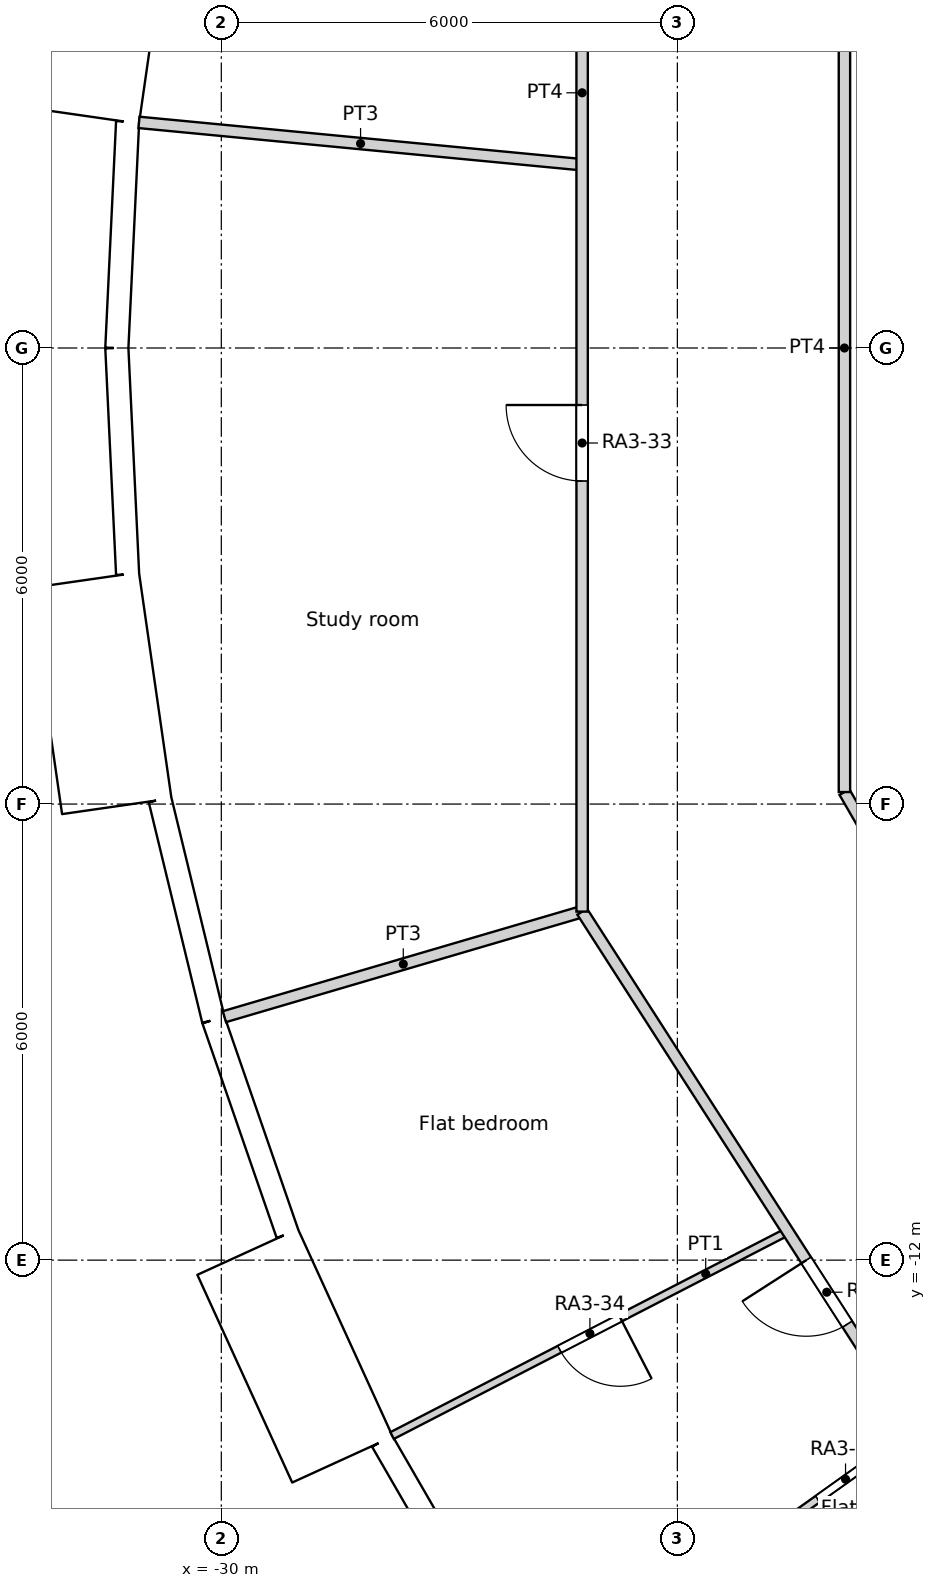
"""IFC4 building model, lengths in metres.
Left out: names, types, materials, properties, quantities, classifications, styles, units other than length and angle.
Written with IfcOpenShell. Run it as: python <this file> out.ifc"""

import sys

from ifc_helpers import new_model, si_unit, direction, frame, frame_2d, origin, origin_2d, place, context, subcontext, project, spatial, rectangle, circle, extrude, element, fill, save


model = new_model("IFC4")
c1 = context("Model", 3, precision=1e-05, world=origin(), true_north=direction((0.0, 1.0)))
c2 = subcontext(c1, "Body", "Model", "MODEL_VIEW")
j1 = project(units=[si_unit("LENGTHUNIT", "METRE"), si_unit("PLANEANGLEUNIT", "RADIAN")], contexts=[c1])
p1 = place(None, origin())
s1 = spatial("IfcSite", under=j1, at=p1, CompositionType="ELEMENT")
p2 = place(p1, origin())
s2 = spatial("IfcBuilding", under=s1, at=p2, CompositionType="ELEMENT")
p3 = place(p2, frame((0.0, 0.0, 49.8)))
s3 = spatial("IfcBuildingStorey", under=s2, at=p3, CompositionType="ELEMENT", Elevation=49.8)
for number, where, z_axis, x_axis in (
    (1, (-30.137, 2.878, 0.0), (0.0, 0.0, 1.0), (1.0, 0.0, 0.0)),
    (2, (-30.137, -2.878, 0.0), (0.0, 0.0, 1.0), (1.0, 0.0, 0.0)),
    (3, (-29.048, -8.529, 0.0), (0.0, 0.0, 1.0), (1.0, 0.0, 0.0)),
    (4, (-26.909, -13.873, 0.0), (0.0, 0.0, 1.0), (1.0, 0.0, 0.0)),
):
    element("IfcColumn", number, at=place(p3, frame(where, z_axis=z_axis, x_axis=x_axis)), inside=s3, PredefinedType="COLUMN", context=c2, shape_type="SweptSolid", body=[
        extrude(circle(Radius=0.7, at=origin_2d()), origin(), (0.0, 0.0, 1.0), 3.6),
    ])
for number, where, z_axis, x_axis in (
    (5, (-24.382, 2.85, 0.0), (0.0, 0.0, 1.0), (1.0, 0.0, 0.0)),
    (6, (-24.382, -2.85, 0.0), (0.0, 0.0, 1.0), (1.0, 0.0, 0.0)),
    (7, (-23.067, -8.396, 0.0), (0.0, 0.0, 1.0), (1.0, 0.0, 0.0)),
):
    element("IfcColumn", number, at=place(p3, frame(where, z_axis=z_axis, x_axis=x_axis)), inside=s3, PredefinedType="COLUMN", context=c2, shape_type="SweptSolid", body=[
        extrude(circle(Radius=0.75, at=origin_2d()), origin(), (0.0, 0.0, 1.0), 3.6),
    ])
p4 = place(p3, frame((-31.375, 6.027, -0.45), z_axis=(0.0, 0.0, 1.0), x_axis=(-0.142332746704, -0.989818866872, 0.0)))
e8 = element("IfcWall", 8, at=p4, inside=s3, PredefinedType="ELEMENTEDWALL", context=c2, shape_type="SweptSolid", body=[
    extrude(rectangle(XDim=3.0, YDim=1.45, at=frame_2d((1.5, 0.0))), origin(), (0.0, 0.0, 1.0), 3.6),
])
p5 = place(p4, frame((1.5, 0.0, 2.0)))
e9 = element("IfcOpeningElement", 9, at=p5, cuts=e8, PredefinedType="OPENING", context=c2, shape_type="SweptSolid", body=[
    extrude(circle(Radius=0.9, at=origin_2d()), frame((0.0, 0.735, 0.0), z_axis=(0.0, -1.0, 0.0), x_axis=(1.0, 0.0, 0.0)), (0.0, 0.0, 1.0), 1.47),
])
p6 = place(p3, frame((-31.233, 2.976, 0.0), z_axis=(0.0, 0.0, 1.0), x_axis=(-0.047604077644, -0.998866283239, 0.0)))
e10 = element("IfcWall", 10, at=p6, inside=s3, PredefinedType="SOLIDWALL", context=c2, shape_type="SweptSolid", body=[
    extrude(rectangle(XDim=2.98, YDim=0.3, at=frame_2d((1.49, 0.0))), origin(), (0.0, 0.0, 1.0), 3.15),
])
p7 = place(p6, frame((1.49, 0.0, 1.55)))
e11 = element("IfcOpeningElement", 11, at=p7, cuts=e10, PredefinedType="OPENING", context=c2, shape_type="SweptSolid", body=[
    extrude(circle(Radius=0.9, at=origin_2d()), frame((0.0, 0.16, 0.0), z_axis=(0.0, -1.0, 0.0), x_axis=(1.0, 0.0, 0.0)), (0.0, 0.0, 1.0), 0.32),
])
p8 = place(p3, frame((-31.375, 0.0, 0.0), z_axis=(0.0, 0.0, 1.0), x_axis=(0.047604077644, -0.998866283239, 0.0)))
e12 = element("IfcWall", 12, at=p8, inside=s3, PredefinedType="SOLIDWALL", context=c2, shape_type="SweptSolid", body=[
    extrude(rectangle(XDim=2.98, YDim=0.3, at=frame_2d((1.49, 0.0))), origin(), (0.0, 0.0, 1.0), 3.15),
])
p9 = place(p8, frame((1.49, 0.0, 1.55)))
e13 = element("IfcOpeningElement", 13, at=p9, cuts=e12, PredefinedType="OPENING", context=c2, shape_type="SweptSolid", body=[
    extrude(circle(Radius=0.9, at=origin_2d()), frame((0.0, 0.16, 0.0), z_axis=(0.0, -1.0, 0.0), x_axis=(1.0, 0.0, 0.0)), (0.0, 0.0, 1.0), 0.32),
])
p10 = place(p3, frame((-31.802, -3.057, -0.45), z_axis=(0.0, 0.0, 1.0), x_axis=(0.142332746704, -0.989818866872, 0.0)))
e14 = element("IfcWall", 14, at=p10, inside=s3, PredefinedType="ELEMENTEDWALL", context=c2, shape_type="SweptSolid", body=[
    extrude(rectangle(XDim=3.0, YDim=1.45, at=frame_2d((1.5, 0.0))), origin(), (0.0, 0.0, 1.0), 3.6),
])
p11 = place(p10, frame((1.5, 0.0, 2.0)))
e15 = element("IfcOpeningElement", 15, at=p11, cuts=e14, PredefinedType="OPENING", context=c2, shape_type="SweptSolid", body=[
    extrude(circle(Radius=0.9, at=origin_2d()), frame((0.0, 0.735, 0.0), z_axis=(0.0, -1.0, 0.0), x_axis=(1.0, 0.0, 0.0)), (0.0, 0.0, 1.0), 1.47),
])
p12 = place(p3, frame((-30.806, -5.944, 0.0), z_axis=(0.0, 0.0, 1.0), x_axis=(0.235743081534, -0.971815414319, 0.0)))
e16 = element("IfcWall", 16, at=p12, inside=s3, PredefinedType="SOLIDWALL", context=c2, shape_type="SweptSolid", body=[
    extrude(rectangle(XDim=2.979, YDim=0.3, at=frame_2d((1.49, 0.0))), origin(), (0.0, 0.0, 1.0), 3.15),
])
p13 = place(p12, frame((1.49, 0.0, 1.55)))
e17 = element("IfcOpeningElement", 17, at=p13, cuts=e16, PredefinedType="OPENING", context=c2, shape_type="SweptSolid", body=[
    extrude(circle(Radius=0.9, at=origin_2d()), frame((0.0, 0.16, 0.0), z_axis=(0.0, -1.0, 0.0), x_axis=(1.0, 0.0, 0.0)), (0.0, 0.0, 1.0), 0.32),
])
p14 = place(p3, frame((-30.104, -8.839, 0.0), z_axis=(0.0, 0.0, 1.0), x_axis=(0.327071167136, -0.944999709856, 0.0)))
e18 = element("IfcWall", 18, at=p14, inside=s3, PredefinedType="SOLIDWALL", context=c2, shape_type="SweptSolid", body=[
    extrude(rectangle(XDim=2.98, YDim=0.3, at=frame_2d((1.49, 0.0))), origin(), (0.0, 0.0, 1.0), 3.15),
])
p15 = place(p14, frame((1.49, 0.0, 1.55)))
e19 = element("IfcOpeningElement", 19, at=p15, cuts=e18, PredefinedType="OPENING", context=c2, shape_type="SweptSolid", body=[
    extrude(circle(Radius=0.9, at=origin_2d()), frame((0.0, 0.16, 0.0), z_axis=(0.0, -1.0, 0.0), x_axis=(1.0, 0.0, 0.0)), (0.0, 0.0, 1.0), 0.32),
])
p16 = place(p3, frame((-29.653, -11.893, -0.45), z_axis=(0.0, 0.0, 1.0), x_axis=(0.415427028395, -0.909626508012, 0.0)))
e20 = element("IfcWall", 20, at=p16, inside=s3, PredefinedType="ELEMENTEDWALL", context=c2, shape_type="SweptSolid", body=[
    extrude(rectangle(XDim=3.0, YDim=1.45, at=frame_2d((1.5, 0.0))), origin(), (0.0, 0.0, 1.0), 3.6),
])
p17 = place(p16, frame((1.5, 0.0, 2.0)))
e21 = element("IfcOpeningElement", 21, at=p17, cuts=e20, PredefinedType="OPENING", context=c2, shape_type="SweptSolid", body=[
    extrude(circle(Radius=0.9, at=origin_2d()), frame((0.0, 0.735, 0.0), z_axis=(0.0, -1.0, 0.0), x_axis=(1.0, 0.0, 0.0)), (0.0, 0.0, 1.0), 1.47),
])
p18 = place(p3, frame((-27.884, -14.382, 0.0), z_axis=(0.0, 0.0, 1.0), x_axis=(0.500025049464, -0.866010940986, 0.0)))
e22 = element("IfcWall", 22, at=p18, inside=s3, PredefinedType="SOLIDWALL", context=c2, shape_type="SweptSolid", body=[
    extrude(rectangle(XDim=2.98, YDim=0.3, at=frame_2d((1.49, 0.0))), origin(), (0.0, 0.0, 1.0), 3.15),
])
p19 = place(p18, frame((1.49, 0.0, 1.55)))
e23 = element("IfcOpeningElement", 23, at=p19, cuts=e22, PredefinedType="OPENING", context=c2, shape_type="SweptSolid", body=[
    extrude(circle(Radius=0.9, at=origin_2d()), frame((0.0, 0.16, 0.0), z_axis=(0.0, -1.0, 0.0), x_axis=(1.0, 0.0, 0.0)), (0.0, 0.0, 1.0), 0.32),
])
p20 = place(p3, frame((-21.802, -5.842, 0.0), z_axis=(0.0, 0.0, 1.0), x_axis=(0.0, 1.0, 0.0)))
e24 = element("IfcWall", 24, at=p20, inside=s3, PredefinedType="PARTITIONING", context=c2, shape_type="SweptSolid", body=[
    extrude(rectangle(XDim=11.684, YDim=0.15, at=frame_2d((5.842, 0.0))), origin(), (0.0, 0.0, 1.0), 3.15),
])
p21 = place(p3, frame((-21.802, -5.842, 0.0), z_axis=(0.0, 0.0, 1.0), x_axis=(0.500277597875, -0.865865073245, 0.0)))
e25 = element("IfcWall", 25, at=p21, inside=s3, PredefinedType="PARTITIONING", context=c2, shape_type="SweptSolid", body=[
    extrude(rectangle(XDim=0.875, YDim=0.15, at=frame_2d((0.438, 0.0))), origin(), (0.0, 0.0, 1.0), 3.15),
])
p22 = place(p3, frame((-25.253, -7.415, 0.0), z_axis=(0.0, 0.0, 1.0), x_axis=(0.0, 1.0, 0.0)))
e26 = element("IfcWall", 26, at=p22, inside=s3, PredefinedType="PARTITIONING", context=c2, shape_type="SweptSolid", body=[
    extrude(rectangle(XDim=14.83, YDim=0.15, at=frame_2d((7.415, 0.0))), origin(), (0.0, 0.0, 1.0), 3.15),
])
p23 = place(p22, frame((5.665, 0.0, 0.0)))
e27 = element("IfcOpeningElement", 27, at=p23, cuts=e26, PredefinedType="OPENING", context=c2, shape_type="SweptSolid", body=[
    extrude(rectangle(XDim=1.0, YDim=2.04, at=frame_2d((0.5, 1.02))), frame((0.0, 0.075, 0.0), z_axis=(0.0, -1.0, 0.0), x_axis=(1.0, 0.0, 0.0)), (0.0, 0.0, 1.0), 0.15),
])
p24 = place(p3, frame((-25.253, -7.415, 0.0), z_axis=(0.0, 0.0, 1.0), x_axis=(0.540667724156, -0.841236240337, 0.0)))
e28 = element("IfcWall", 28, at=p24, inside=s3, PredefinedType="PARTITIONING", context=c2, shape_type="SweptSolid", body=[
    extrude(rectangle(XDim=14.83, YDim=0.15, at=frame_2d((7.415, 0.0))), origin(), (0.0, 0.0, 1.0), 3.15),
])
p25 = place(p24, frame((5.452, 0.0, 0.0)))
e29 = element("IfcOpeningElement", 29, at=p25, cuts=e28, PredefinedType="OPENING", context=c2, shape_type="SweptSolid", body=[
    extrude(rectangle(XDim=1.0, YDim=2.1, at=frame_2d((0.5, 1.05))), frame((0.0, 0.075, 0.0), z_axis=(0.0, -1.0, 0.0), x_axis=(1.0, 0.0, 0.0)), (0.0, 0.0, 1.0), 0.15),
])
p26 = place(p3, frame((-31.083, 2.968, 0.0), z_axis=(0.0, 0.0, 1.0), x_axis=(0.995465070325, -0.095127775983, 0.0)))
e30 = element("IfcWall", 30, at=p26, inside=s3, PredefinedType="PARTITIONING", context=c2, shape_type="SweptSolid", body=[
    extrude(rectangle(XDim=5.857, YDim=0.15, at=frame_2d((2.928, 0.0))), origin(), (0.0, 0.0, 1.0), 3.15),
])
p27 = place(p3, frame((-29.959, -8.797, 0.0), z_axis=(0.0, 0.0, 1.0), x_axis=(0.959478767209, 0.281780934902, 0.0)))
e31 = element("IfcWall", 31, at=p27, inside=s3, PredefinedType="PARTITIONING", context=c2, shape_type="SweptSolid", body=[
    extrude(rectangle(XDim=4.905, YDim=0.15, at=frame_2d((2.452, 0.0))), origin(), (0.0, 0.0, 1.0), 3.15),
])
p28 = place(p3, frame((-27.753, -14.308, 0.0), z_axis=(0.0, 0.0, 1.0), x_axis=(0.88877955153, 0.45833493079, 0.0)))
e32 = element("IfcWall", 32, at=p28, inside=s3, PredefinedType="PARTITIONING", context=c2, shape_type="SweptSolid", body=[
    extrude(rectangle(XDim=5.856, YDim=0.1, at=frame_2d((2.928, 0.0))), origin(), (0.0, 0.0, 1.0), 3.15),
])
p29 = place(p28, frame((2.478, 0.0, 0.0)))
e33 = element("IfcOpeningElement", 33, at=p29, cuts=e32, PredefinedType="OPENING", context=c2, shape_type="SweptSolid", body=[
    extrude(rectangle(XDim=0.9, YDim=2.1, at=frame_2d((0.45, 1.05))), frame((0.0, 0.05, 0.0), z_axis=(0.0, -1.0, 0.0), x_axis=(1.0, 0.0, 0.0)), (0.0, 0.0, 1.0), 0.1),
])
p30 = place(p3, frame((-22.703, -15.535, 0.0), z_axis=(0.0, 0.0, 1.0), x_axis=(0.814525331415, 0.580127989743, 0.0)))
e34 = element("IfcWall", 34, at=p30, inside=s3, PredefinedType="PARTITIONING", context=c2, shape_type="SweptSolid", body=[
    extrude(rectangle(XDim=2.248, YDim=0.1, at=frame_2d((1.124, 0.0))), origin(), (0.0, 0.0, 1.0), 3.15),
])
p31 = place(p30, frame((0.674, 0.0, 0.0)))
e35 = element("IfcOpeningElement", 35, at=p31, cuts=e34, PredefinedType="OPENING", context=c2, shape_type="SweptSolid", body=[
    extrude(rectangle(XDim=0.9, YDim=2.0, at=frame_2d((0.45, 1.0))), frame((0.0, 0.05, 0.0), z_axis=(0.0, -1.0, 0.0), x_axis=(1.0, 0.0, 0.0)), (0.0, 0.0, 1.0), 0.1),
])
p32 = place(p5, origin())
e36 = element("IfcWindow", 36, at=p32, inside=s3, PartitioningType="SINGLE_PANEL", PredefinedType="WINDOW", context=c2, shape_type="SweptSolid", body=[
    extrude(circle(Radius=0.9, at=origin_2d()), frame((0.0, 0.695, 0.0), z_axis=(0.0, -1.0, 0.0), x_axis=(1.0, 0.0, 0.0)), (0.0, 0.0, 1.0), 0.1),
])
fill(e9, e36)
p33 = place(p7, origin())
e37 = element("IfcWindow", 37, at=p33, inside=s3, PartitioningType="SINGLE_PANEL", PredefinedType="WINDOW", context=c2, shape_type="SweptSolid", body=[
    extrude(circle(Radius=0.9, at=origin_2d()), frame((0.0, 0.12, 0.0), z_axis=(0.0, -1.0, 0.0), x_axis=(1.0, 0.0, 0.0)), (0.0, 0.0, 1.0), 0.1),
])
fill(e11, e37)
p34 = place(p9, origin())
e38 = element("IfcWindow", 38, at=p34, inside=s3, PartitioningType="SINGLE_PANEL", PredefinedType="WINDOW", context=c2, shape_type="SweptSolid", body=[
    extrude(circle(Radius=0.9, at=origin_2d()), frame((0.0, 0.12, 0.0), z_axis=(0.0, -1.0, 0.0), x_axis=(1.0, 0.0, 0.0)), (0.0, 0.0, 1.0), 0.1),
])
fill(e13, e38)
p35 = place(p11, origin())
e39 = element("IfcWindow", 39, at=p35, inside=s3, PartitioningType="SINGLE_PANEL", PredefinedType="WINDOW", context=c2, shape_type="SweptSolid", body=[
    extrude(circle(Radius=0.9, at=origin_2d()), frame((0.0, 0.695, 0.0), z_axis=(0.0, -1.0, 0.0), x_axis=(1.0, 0.0, 0.0)), (0.0, 0.0, 1.0), 0.1),
])
fill(e15, e39)
p36 = place(p13, origin())
e40 = element("IfcWindow", 40, at=p36, inside=s3, PartitioningType="SINGLE_PANEL", PredefinedType="WINDOW", context=c2, shape_type="SweptSolid", body=[
    extrude(circle(Radius=0.9, at=origin_2d()), frame((0.0, 0.12, 0.0), z_axis=(0.0, -1.0, 0.0), x_axis=(1.0, 0.0, 0.0)), (0.0, 0.0, 1.0), 0.1),
])
fill(e17, e40)
p37 = place(p15, origin())
e41 = element("IfcWindow", 41, at=p37, inside=s3, PartitioningType="SINGLE_PANEL", PredefinedType="WINDOW", context=c2, shape_type="SweptSolid", body=[
    extrude(circle(Radius=0.9, at=origin_2d()), frame((0.0, 0.12, 0.0), z_axis=(0.0, -1.0, 0.0), x_axis=(1.0, 0.0, 0.0)), (0.0, 0.0, 1.0), 0.1),
])
fill(e19, e41)
p38 = place(p17, origin())
e42 = element("IfcWindow", 42, at=p38, inside=s3, PartitioningType="SINGLE_PANEL", PredefinedType="WINDOW", context=c2, shape_type="SweptSolid", body=[
    extrude(circle(Radius=0.9, at=origin_2d()), frame((0.0, 0.695, 0.0), z_axis=(0.0, -1.0, 0.0), x_axis=(1.0, 0.0, 0.0)), (0.0, 0.0, 1.0), 0.1),
])
fill(e21, e42)
p39 = place(p19, origin())
e43 = element("IfcWindow", 43, at=p39, inside=s3, PartitioningType="SINGLE_PANEL", PredefinedType="WINDOW", context=c2, shape_type="SweptSolid", body=[
    extrude(circle(Radius=0.9, at=origin_2d()), frame((0.0, 0.12, 0.0), z_axis=(0.0, -1.0, 0.0), x_axis=(1.0, 0.0, 0.0)), (0.0, 0.0, 1.0), 0.1),
])
fill(e23, e43)
p40 = place(p23, origin())
e44 = element("IfcDoor", 44, at=p40, inside=s3, OperationType="SINGLE_SWING_RIGHT", PredefinedType="DOOR", context=c2, shape_type="SweptSolid", body=[
    extrude(rectangle(XDim=1.0, YDim=2.04, at=frame_2d((0.5, 1.02))), frame((0.0, 0.025, 0.0), z_axis=(0.0, -1.0, 0.0), x_axis=(1.0, 0.0, 0.0)), (0.0, 0.0, 1.0), 0.05),
])
fill(e27, e44)
p41 = place(p29, origin())
e45 = element("IfcDoor", 45, at=p41, inside=s3, OperationType="SINGLE_SWING_LEFT", PredefinedType="DOOR", context=c2, shape_type="SweptSolid", body=[
    extrude(rectangle(XDim=0.9, YDim=2.1, at=frame_2d((0.45, 1.05))), frame((0.0, 0.025, 0.0), z_axis=(0.0, -1.0, 0.0), x_axis=(1.0, 0.0, 0.0)), (0.0, 0.0, 1.0), 0.05),
])
fill(e33, e45)
p42 = place(p31, origin())
e46 = element("IfcDoor", 46, at=p42, inside=s3, OperationType="SINGLE_SWING_RIGHT", PredefinedType="DOOR", context=c2, shape_type="SweptSolid", body=[
    extrude(rectangle(XDim=0.9, YDim=2.0, at=frame_2d((0.45, 1.0))), frame((0.0, 0.025, 0.0), z_axis=(0.0, -1.0, 0.0), x_axis=(1.0, 0.0, 0.0)), (0.0, 0.0, 1.0), 0.05),
])
fill(e35, e46)
p43 = place(p25, origin())
e47 = element("IfcDoor", 47, at=p43, inside=s3, OperationType="SINGLE_SWING_RIGHT", PredefinedType="DOOR", context=c2, shape_type="SweptSolid", body=[
    extrude(rectangle(XDim=1.0, YDim=2.1, at=frame_2d((0.5, 1.05))), frame((0.0, 0.025, 0.0), z_axis=(0.0, -1.0, 0.0), x_axis=(1.0, 0.0, 0.0)), (0.0, 0.0, 1.0), 0.05),
])
fill(e29, e47)
save(model, sys.argv[1])
